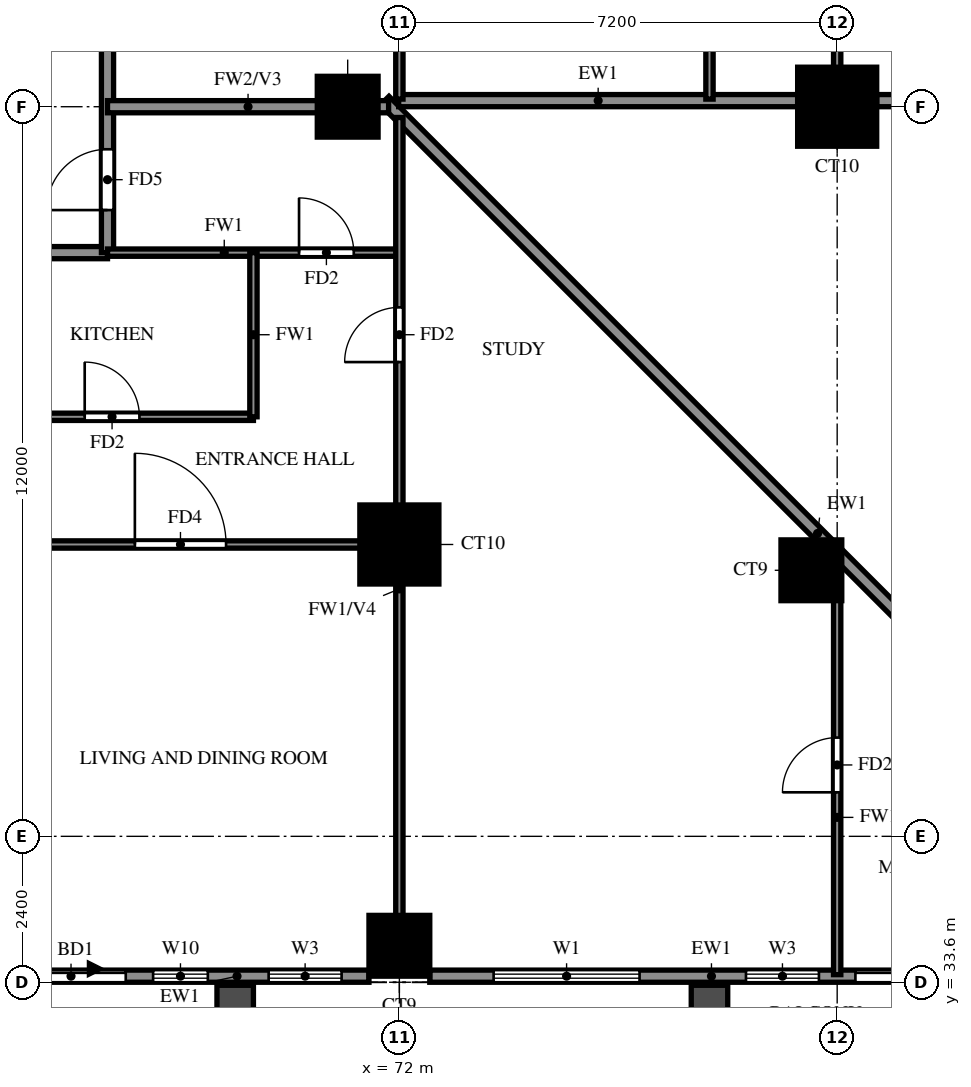
"""IFC4 building model, lengths in metres.
Left out: names, types, materials, properties, quantities, classifications, styles, units other than length and angle.
Written with IfcOpenShell. Run it as: python <this file> out.ifc"""

import sys

from ifc_helpers import new_model, si_unit, direction, frame, frame_2d, origin, origin_2d, place, context, subcontext, project, spatial, rectangle, extrude, source, transform, mapped, element, fill, save


model = new_model("IFC4")
c1 = context("Model", 3, precision=1e-05, world=origin(), true_north=direction((0.0, 1.0)))
c2 = subcontext(c1, "Body", "Model", "MODEL_VIEW")
j1 = project(units=[si_unit("LENGTHUNIT", "METRE"), si_unit("PLANEANGLEUNIT", "RADIAN")], contexts=[c1])
p1 = place(None, origin())
s1 = spatial("IfcSite", under=j1, at=p1, CompositionType="ELEMENT")
p2 = place(p1, origin())
s2 = spatial("IfcBuilding", under=s1, at=p2, CompositionType="ELEMENT")
p3 = place(p2, frame((0.0, 0.0, 62.0)))
s3 = spatial("IfcBuildingStorey", under=s2, at=p3, CompositionType="ELEMENT", Elevation=62.0)
m1 = source(origin(), c2, "Body", "SweptSolid", [
    extrude(rectangle(XDim=1.0, YDim=1.0, at=origin_2d()), origin(), (0.0, 0.0, 1.0), 3.18),
])
for number, where, z_axis, x_axis in (
    (1, (72.0, 34.2, 0.0), (0.0, 0.0, 1.0), (1.0, 0.0, 0.0)),
    (2, (78.776, 40.376, 0.0), (0.0, 0.0, 1.0), (1.0, 0.0, 0.0)),
):
    element("IfcColumn", number, at=place(p3, frame(where, z_axis=z_axis, x_axis=x_axis)), inside=s3, PredefinedType="COLUMN", context=c2, shape_type="MappedRepresentation", body=[
        mapped(m1, transform((0.0, 0.0, 0.0))),
    ])
m2 = source(origin(), c2, "Body", "SweptSolid", [
    extrude(rectangle(XDim=1.3, YDim=1.3, at=origin_2d()), origin(), (0.0, 0.0, 1.0), 3.18),
])
p4 = place(p3, frame((72.0, 40.8, 0.0), z_axis=(0.0, 0.0, 1.0), x_axis=(1.0, 0.0, 0.0)))
e3 = element("IfcColumn", 3, at=p4, inside=s3, PredefinedType="COLUMN", context=c2, shape_type="MappedRepresentation", body=[
    mapped(m2, transform((0.0, 0.0, 0.0))),
])
p5 = place(p3, frame((71.15, 48.0, 0.0), z_axis=(0.0, 0.0, 1.0), x_axis=(1.0, 0.0, 0.0)))
e4 = element("IfcColumn", 4, at=p5, inside=s3, PredefinedType="COLUMN", context=c2, shape_type="MappedRepresentation", body=[
    mapped(m1, transform((0.0, 0.0, 0.0))),
])
p6 = place(p3, frame((79.2, 48.0, 0.0), z_axis=(0.0, 0.0, 1.0), x_axis=(1.0, 0.0, 0.0)))
e5 = element("IfcColumn", 5, at=p6, inside=s3, PredefinedType="COLUMN", context=c2, shape_type="MappedRepresentation", body=[
    mapped(m2, transform((0.0, 0.0, 0.0))),
])
p7 = place(p3, frame((85.996, 33.863, 0.0), z_axis=(0.0, 0.0, 1.0), x_axis=(-0.707100718496, 0.707112843825, 0.0)))
e6 = element("IfcWall", 6, at=p7, inside=s3, PredefinedType="SOLIDWALL", context=c2, shape_type="SweptSolid", body=[
    extrude(rectangle(XDim=20.135, YDim=0.2, at=frame_2d((10.067, 0.0))), origin(), (0.0, 0.0, 1.0), 3.18),
])
p8 = place(p3, frame((71.989, 48.1, 0.0), z_axis=(0.0, 0.0, 1.0), x_axis=(1.0, 0.0, 0.0)))
e7 = element("IfcWall", 7, at=p8, inside=s3, PredefinedType="SOLIDWALL", context=c2, shape_type="SweptSolid", body=[
    extrude(rectangle(XDim=6.562, YDim=0.2, at=frame_2d((3.281, 0.0))), origin(), (0.0, 0.0, 1.0), 3.18),
])
p9 = place(p3, frame((79.85, 48.1, 0.0), z_axis=(0.0, 0.0, 1.0), x_axis=(1.0, 0.0, 0.0)))
e8 = element("IfcWall", 8, at=p9, inside=s3, PredefinedType="SOLIDWALL", context=c2, shape_type="SweptSolid", body=[
    extrude(rectangle(XDim=5.45, YDim=0.2, at=frame_2d((2.725, 0.0))), origin(), (0.0, 0.0, 1.0), 3.18),
])
p10 = place(p9, frame((1.525, 0.0, 0.6)))
e9 = element("IfcOpeningElement", 9, at=p10, cuts=e8, PredefinedType="OPENING", context=c2, shape_type="SweptSolid", body=[
    extrude(rectangle(XDim=2.4, YDim=2.4, at=frame_2d((1.2, 1.2))), frame((0.0, 0.11, 0.0), z_axis=(0.0, -1.0, 0.0), x_axis=(1.0, 0.0, 0.0)), (0.0, 0.0, 1.0), 0.22),
])
p11 = place(p3, frame((65.3, 33.7, 0.0), z_axis=(0.0, 0.0, 1.0), x_axis=(1.0, 0.0, 0.0)))
e10 = element("IfcWall", 10, at=p11, inside=s3, PredefinedType="SOLIDWALL", context=c2, shape_type="SweptSolid", body=[
    extrude(rectangle(XDim=6.2, YDim=0.2, at=frame_2d((3.1, 0.0))), origin(), (0.0, 0.0, 1.0), 3.18),
])
p12 = place(p11, frame((0.4, 0.0, 0.0)))
e11 = element("IfcOpeningElement", 11, at=p12, cuts=e10, PredefinedType="OPENING", context=c2, shape_type="SweptSolid", body=[
    extrude(rectangle(XDim=1.8, YDim=2.4, at=frame_2d((0.9, 1.2))), frame((0.0, 0.11, 0.0), z_axis=(0.0, -1.0, 0.0), x_axis=(1.0, 0.0, 0.0)), (0.0, 0.0, 1.0), 0.22),
])
p13 = place(p11, frame((2.65, 0.0, 0.6)))
e12 = element("IfcOpeningElement", 12, at=p13, cuts=e10, PredefinedType="OPENING", context=c2, shape_type="SweptSolid", body=[
    extrude(rectangle(XDim=0.9, YDim=2.4, at=frame_2d((0.45, 1.2))), frame((0.0, 0.11, 0.0), z_axis=(0.0, -1.0, 0.0), x_axis=(1.0, 0.0, 0.0)), (0.0, 0.0, 1.0), 0.22),
])
p14 = place(p11, frame((4.55, 0.0, 0.6)))
e13 = element("IfcOpeningElement", 13, at=p14, cuts=e10, PredefinedType="OPENING", context=c2, shape_type="SweptSolid", body=[
    extrude(rectangle(XDim=1.2, YDim=2.4, at=frame_2d((0.6, 1.2))), frame((0.0, 0.11, 0.0), z_axis=(0.0, -1.0, 0.0), x_axis=(1.0, 0.0, 0.0)), (0.0, 0.0, 1.0), 0.22),
])
p15 = place(p3, frame((72.5, 33.7, 0.0), z_axis=(0.0, 0.0, 1.0), x_axis=(1.0, 0.0, 0.0)))
e14 = element("IfcWall", 14, at=p15, inside=s3, PredefinedType="SOLIDWALL", context=c2, shape_type="SweptSolid", body=[
    extrude(rectangle(XDim=10.9, YDim=0.2, at=frame_2d((5.45, 0.0))), origin(), (0.0, 0.0, 1.0), 3.18),
])
p16 = place(p15, frame((7.0, 0.0, 0.0)))
e15 = element("IfcOpeningElement", 15, at=p16, cuts=e14, PredefinedType="OPENING", context=c2, shape_type="SweptSolid", body=[
    extrude(rectangle(XDim=1.8, YDim=2.4, at=frame_2d((0.9, 1.2))), frame((0.0, 0.11, 0.0), z_axis=(0.0, -1.0, 0.0), x_axis=(1.0, 0.0, 0.0)), (0.0, 0.0, 1.0), 0.22),
])
p17 = place(p15, frame((1.05, 0.0, 0.6)))
e16 = element("IfcOpeningElement", 16, at=p17, cuts=e14, PredefinedType="OPENING", context=c2, shape_type="SweptSolid", body=[
    extrude(rectangle(XDim=2.4, YDim=2.4, at=frame_2d((1.2, 1.2))), frame((0.0, 0.11, 0.0), z_axis=(0.0, -1.0, 0.0), x_axis=(1.0, 0.0, 0.0)), (0.0, 0.0, 1.0), 0.22),
])
p18 = place(p15, frame((5.2, 0.0, 0.6)))
e17 = element("IfcOpeningElement", 17, at=p18, cuts=e14, PredefinedType="OPENING", context=c2, shape_type="SweptSolid", body=[
    extrude(rectangle(XDim=1.2, YDim=2.4, at=frame_2d((0.6, 1.2))), frame((0.0, 0.11, 0.0), z_axis=(0.0, -1.0, 0.0), x_axis=(1.0, 0.0, 0.0)), (0.0, 0.0, 1.0), 0.22),
])
p19 = place(p15, frame((9.3, 0.0, 0.6)))
e18 = element("IfcOpeningElement", 18, at=p19, cuts=e14, PredefinedType="OPENING", context=c2, shape_type="SweptSolid", body=[
    extrude(rectangle(XDim=1.2, YDim=2.4, at=frame_2d((0.6, 1.2))), frame((0.0, 0.11, 0.0), z_axis=(0.0, -1.0, 0.0), x_axis=(1.0, 0.0, 0.0)), (0.0, 0.0, 1.0), 0.22),
])
for number, where, z_axis, x_axis in (
    (19, (69.3, 33.55, 0.0), (0.0, 0.0, 1.0), (0.0, -1.0, 0.0)),
    (20, (77.1, 33.55, 0.0), (0.0, 0.0, 1.0), (0.0, -1.0, 0.0)),
):
    element("IfcWall", number, at=place(p3, frame(where, z_axis=z_axis, x_axis=x_axis)), inside=s3, PredefinedType="SOLIDWALL", context=c2, shape_type="SweptSolid", body=[
        extrude(rectangle(XDim=2.65, YDim=0.6, at=frame_2d((1.325, 0.0))), origin(), (0.0, 0.0, 1.0), 2.85),
    ])
p20 = place(p3, frame((60.0, 45.6, 0.0), z_axis=(0.0, 0.0, 1.0), x_axis=(1.0, 0.0, 0.0)))
e21 = element("IfcWall", 21, at=p20, inside=s3, PredefinedType="SOLIDWALL", context=c2, shape_type="SweptSolid", body=[
    extrude(rectangle(XDim=7.2, YDim=0.2, at=frame_2d((3.6, 0.0))), origin(), (0.0, 0.0, 1.0), 3.18),
])
p21 = place(p3, frame((67.2, 45.6, 0.0), z_axis=(0.0, 0.0, 1.0), x_axis=(0.0, 1.0, 0.0)))
e22 = element("IfcWall", 22, at=p21, inside=s3, PredefinedType="SOLIDWALL", context=c2, shape_type="SweptSolid", body=[
    extrude(rectangle(XDim=12.0, YDim=0.2, at=frame_2d((6.0, 0.0))), origin(), (0.0, 0.0, 1.0), 3.18),
])
p22 = place(p21, frame((10.3, 0.0, 0.0)))
e23 = element("IfcOpeningElement", 23, at=p22, cuts=e22, PredefinedType="OPENING", context=c2, shape_type="SweptSolid", body=[
    extrude(rectangle(XDim=1.0, YDim=2.1, at=frame_2d((0.5, 1.05))), frame((0.0, 0.11, 0.0), z_axis=(0.0, -1.0, 0.0), x_axis=(1.0, 0.0, 0.0)), (0.0, 0.0, 1.0), 0.22),
])
p23 = place(p21, frame((0.7, 0.0, 0.0)))
e24 = element("IfcOpeningElement", 24, at=p23, cuts=e22, PredefinedType="OPENING", context=c2, shape_type="SweptSolid", body=[
    extrude(rectangle(XDim=1.0, YDim=2.1, at=frame_2d((0.5, 1.05))), frame((0.0, 0.11, 0.0), z_axis=(0.0, -1.0, 0.0), x_axis=(1.0, 0.0, 0.0)), (0.0, 0.0, 1.0), 0.22),
])
p24 = place(p3, frame((67.2, 48.0, 0.0), z_axis=(0.0, 0.0, 1.0), x_axis=(1.0, 0.0, 0.0)))
e25 = element("IfcWall", 25, at=p24, inside=s3, PredefinedType="SOLIDWALL", context=c2, shape_type="SweptSolid", body=[
    extrude(rectangle(XDim=4.623, YDim=0.2, at=frame_2d((2.312, 0.0))), origin(), (0.0, 0.0, 1.0), 3.18),
])
p25 = place(p3, frame((60.0, 40.8, 0.0), z_axis=(0.0, 0.0, 1.0), x_axis=(1.0, 0.0, 0.0)))
e26 = element("IfcWall", 26, at=p25, inside=s3, PredefinedType="PARTITIONING", context=c2, shape_type="SweptSolid", body=[
    extrude(rectangle(XDim=12.0, YDim=0.12, at=frame_2d((6.0, 0.0))), origin(), (0.0, 0.0, 1.0), 3.18),
])
p26 = place(p25, frame((7.65, 0.0, 0.0)))
e27 = element("IfcOpeningElement", 27, at=p26, cuts=e26, PredefinedType="OPENING", context=c2, shape_type="SweptSolid", body=[
    extrude(rectangle(XDim=1.5, YDim=2.1, at=frame_2d((0.75, 1.05))), frame((0.0, 0.07, 0.0), z_axis=(0.0, -1.0, 0.0), x_axis=(1.0, 0.0, 0.0)), (0.0, 0.0, 1.0), 0.14),
])
p27 = place(p25, frame((1.95, 0.0, 0.0)))
e28 = element("IfcOpeningElement", 28, at=p27, cuts=e26, PredefinedType="OPENING", context=c2, shape_type="SweptSolid", body=[
    extrude(rectangle(XDim=0.9, YDim=2.1, at=frame_2d((0.45, 1.05))), frame((0.0, 0.07, 0.0), z_axis=(0.0, -1.0, 0.0), x_axis=(1.0, 0.0, 0.0)), (0.0, 0.0, 1.0), 0.14),
])
p28 = place(p3, frame((60.0, 42.9, 0.0), z_axis=(0.0, 0.0, 1.0), x_axis=(1.0, 0.0, 0.0)))
e29 = element("IfcWall", 29, at=p28, inside=s3, PredefinedType="PARTITIONING", context=c2, shape_type="SweptSolid", body=[
    extrude(rectangle(XDim=9.6, YDim=0.12, at=frame_2d((4.8, 0.0))), origin(), (0.0, 0.0, 1.0), 3.18),
])
p29 = place(p28, frame((6.825, 0.0, 0.0)))
e30 = element("IfcOpeningElement", 30, at=p29, cuts=e29, PredefinedType="OPENING", context=c2, shape_type="SweptSolid", body=[
    extrude(rectangle(XDim=0.9, YDim=2.1, at=frame_2d((0.45, 1.05))), frame((0.0, 0.07, 0.0), z_axis=(0.0, -1.0, 0.0), x_axis=(1.0, 0.0, 0.0)), (0.0, 0.0, 1.0), 0.14),
])
p30 = place(p28, frame((3.3, 0.0, 0.0)))
e31 = element("IfcOpeningElement", 31, at=p30, cuts=e29, PredefinedType="OPENING", context=c2, shape_type="SweptSolid", body=[
    extrude(rectangle(XDim=0.8, YDim=2.1, at=frame_2d((0.4, 1.05))), frame((0.0, 0.07, 0.0), z_axis=(0.0, -1.0, 0.0), x_axis=(1.0, 0.0, 0.0)), (0.0, 0.0, 1.0), 0.14),
])
p31 = place(p28, frame((0.775, 0.0, 0.0)))
e32 = element("IfcOpeningElement", 32, at=p31, cuts=e29, PredefinedType="OPENING", context=c2, shape_type="SweptSolid", body=[
    extrude(rectangle(XDim=0.9, YDim=2.1, at=frame_2d((0.45, 1.05))), frame((0.0, 0.07, 0.0), z_axis=(0.0, -1.0, 0.0), x_axis=(1.0, 0.0, 0.0)), (0.0, 0.0, 1.0), 0.14),
])
p32 = place(p3, frame((67.2, 45.6, 0.0), z_axis=(0.0, 0.0, 1.0), x_axis=(1.0, 0.0, 0.0)))
e33 = element("IfcWall", 33, at=p32, inside=s3, PredefinedType="PARTITIONING", context=c2, shape_type="SweptSolid", body=[
    extrude(rectangle(XDim=4.8, YDim=0.12, at=frame_2d((2.4, 0.0))), origin(), (0.0, 0.0, 1.0), 3.18),
])
p33 = place(p32, frame((3.15, 0.0, 0.0)))
e34 = element("IfcOpeningElement", 34, at=p33, cuts=e33, PredefinedType="OPENING", context=c2, shape_type="SweptSolid", body=[
    extrude(rectangle(XDim=0.9, YDim=2.1, at=frame_2d((0.45, 1.05))), frame((0.0, 0.07, 0.0), z_axis=(0.0, -1.0, 0.0), x_axis=(1.0, 0.0, 0.0)), (0.0, 0.0, 1.0), 0.14),
])
p34 = place(p3, frame((69.6, 42.9, 0.0), z_axis=(0.0, 0.0, 1.0), x_axis=(0.0, 1.0, 0.0)))
e35 = element("IfcWall", 35, at=p34, inside=s3, PredefinedType="PARTITIONING", context=c2, shape_type="SweptSolid", body=[
    extrude(rectangle(XDim=2.7, YDim=0.12, at=frame_2d((1.35, 0.0))), origin(), (0.0, 0.0, 1.0), 3.18),
])
p35 = place(p3, frame((72.0, 33.725, 0.0), z_axis=(0.0, 0.0, 1.0), x_axis=(0.0, 1.0, 0.0)))
e36 = element("IfcWall", 36, at=p35, inside=s3, PredefinedType="PARTITIONING", context=c2, shape_type="SweptSolid", body=[
    extrude(rectangle(XDim=14.098, YDim=0.12, at=frame_2d((7.049, 0.0))), origin(), (0.0, 0.0, 1.0), 2.28),
])
p36 = place(p35, frame((10.075, 0.0, 0.0)))
e37 = element("IfcOpeningElement", 37, at=p36, cuts=e36, PredefinedType="OPENING", context=c2, shape_type="SweptSolid", body=[
    extrude(rectangle(XDim=0.9, YDim=2.1, at=frame_2d((0.45, 1.05))), frame((0.0, 0.07, 0.0), z_axis=(0.0, -1.0, 0.0), x_axis=(1.0, 0.0, 0.0)), (0.0, 0.0, 1.0), 0.14),
])
p37 = place(p3, frame((72.0, 48.125, 0.0), z_axis=(0.0, 0.0, 1.0), x_axis=(0.0, 1.0, 0.0)))
e38 = element("IfcWall", 38, at=p37, inside=s3, PredefinedType="PARTITIONING", context=c2, shape_type="SweptSolid", body=[
    extrude(rectangle(XDim=7.075, YDim=0.12, at=frame_2d((3.538, 0.0))), origin(), (0.0, 0.0, 1.0), 3.18),
])
p38 = place(p3, frame((77.1, 48.125, 0.0), z_axis=(0.0, 0.0, 1.0), x_axis=(0.0, 1.0, 0.0)))
e39 = element("IfcWall", 39, at=p38, inside=s3, PredefinedType="PARTITIONING", context=c2, shape_type="SweptSolid", body=[
    extrude(rectangle(XDim=7.075, YDim=0.12, at=frame_2d((3.538, 0.0))), origin(), (0.0, 0.0, 1.0), 3.18),
])
p39 = place(p38, frame((3.087, 0.0, 0.0)))
e40 = element("IfcOpeningElement", 40, at=p39, cuts=e39, PredefinedType="OPENING", context=c2, shape_type="SweptSolid", body=[
    extrude(rectangle(XDim=0.9, YDim=2.1, at=frame_2d((0.45, 1.05))), frame((0.0, 0.07, 0.0), z_axis=(0.0, -1.0, 0.0), x_axis=(1.0, 0.0, 0.0)), (0.0, 0.0, 1.0), 0.14),
])
p40 = place(p3, frame((79.2, 33.725, 0.0), z_axis=(0.0, 0.0, 1.0), x_axis=(0.0, 1.0, 0.0)))
e41 = element("IfcWall", 41, at=p40, inside=s3, PredefinedType="PARTITIONING", context=c2, shape_type="SweptSolid", body=[
    extrude(rectangle(XDim=6.898, YDim=0.12, at=frame_2d((3.449, 0.0))), origin(), (0.0, 0.0, 1.0), 3.18),
])
p41 = place(p40, frame((2.999, 0.0, 0.0)))
e42 = element("IfcOpeningElement", 42, at=p41, cuts=e41, PredefinedType="OPENING", context=c2, shape_type="SweptSolid", body=[
    extrude(rectangle(XDim=0.9, YDim=2.1, at=frame_2d((0.45, 1.05))), frame((0.0, 0.07, 0.0), z_axis=(0.0, -1.0, 0.0), x_axis=(1.0, 0.0, 0.0)), (0.0, 0.0, 1.0), 0.14),
])
p42 = place(p3, frame((79.2, 48.125, 0.0), z_axis=(0.0, 0.0, 1.0), x_axis=(0.0, 1.0, 0.0)))
e43 = element("IfcWall", 43, at=p42, inside=s3, PredefinedType="PARTITIONING", context=c2, shape_type="SweptSolid", body=[
    extrude(rectangle(XDim=21.475, YDim=0.12, at=frame_2d((10.738, 0.0))), origin(), (0.0, 0.0, 1.0), 3.18),
])
p43 = place(p42, frame((1.288, 0.0, 0.0)))
e44 = element("IfcOpeningElement", 44, at=p43, cuts=e43, PredefinedType="OPENING", context=c2, shape_type="SweptSolid", body=[
    extrude(rectangle(XDim=0.9, YDim=2.1, at=frame_2d((0.45, 1.05))), frame((0.0, 0.07, 0.0), z_axis=(0.0, -1.0, 0.0), x_axis=(1.0, 0.0, 0.0)), (0.0, 0.0, 1.0), 0.14),
])
p44 = place(p42, frame((4.825, 0.0, 0.0)))
e45 = element("IfcOpeningElement", 45, at=p44, cuts=e43, PredefinedType="OPENING", context=c2, shape_type="SweptSolid", body=[
    extrude(rectangle(XDim=0.9, YDim=2.1, at=frame_2d((0.45, 1.05))), frame((0.0, 0.07, 0.0), z_axis=(0.0, -1.0, 0.0), x_axis=(1.0, 0.0, 0.0)), (0.0, 0.0, 1.0), 0.14),
])
p45 = place(p42, frame((9.925, 0.0, 0.0)))
e46 = element("IfcOpeningElement", 46, at=p45, cuts=e43, PredefinedType="OPENING", context=c2, shape_type="SweptSolid", body=[
    extrude(rectangle(XDim=1.5, YDim=2.1, at=frame_2d((0.75, 1.05))), frame((0.0, 0.07, 0.0), z_axis=(0.0, -1.0, 0.0), x_axis=(1.0, 0.0, 0.0)), (0.0, 0.0, 1.0), 0.14),
])
p46 = place(p42, frame((15.625, 0.0, 0.0)))
e47 = element("IfcOpeningElement", 47, at=p46, cuts=e43, PredefinedType="OPENING", context=c2, shape_type="SweptSolid", body=[
    extrude(rectangle(XDim=0.9, YDim=2.1, at=frame_2d((0.45, 1.05))), frame((0.0, 0.07, 0.0), z_axis=(0.0, -1.0, 0.0), x_axis=(1.0, 0.0, 0.0)), (0.0, 0.0, 1.0), 0.14),
])
p47 = place(p42, frame((19.225, 0.0, 0.0)))
e48 = element("IfcOpeningElement", 48, at=p47, cuts=e43, PredefinedType="OPENING", context=c2, shape_type="SweptSolid", body=[
    extrude(rectangle(XDim=0.9, YDim=2.1, at=frame_2d((0.45, 1.05))), frame((0.0, 0.07, 0.0), z_axis=(0.0, -1.0, 0.0), x_axis=(1.0, 0.0, 0.0)), (0.0, 0.0, 1.0), 0.14),
])
p48 = place(p12, origin())
e49 = element("IfcDoor", 49, at=p48, inside=s3, OperationType="DOUBLE_DOOR_SLIDING", PredefinedType="DOOR", context=c2, shape_type="SweptSolid", body=[
    extrude(rectangle(XDim=1.8, YDim=2.4, at=frame_2d((0.9, 1.2))), frame((0.0, 0.025, 0.0), z_axis=(0.0, -1.0, 0.0), x_axis=(1.0, 0.0, 0.0)), (0.0, 0.0, 1.0), 0.05),
])
fill(e11, e49)
p49 = place(p13, origin())
e50 = element("IfcWindow", 50, at=p49, inside=s3, PartitioningType="SINGLE_PANEL", PredefinedType="WINDOW", context=c2, shape_type="SweptSolid", body=[
    extrude(rectangle(XDim=0.9, YDim=2.4, at=frame_2d((0.45, 1.2))), frame((0.0, 0.03, 0.0), z_axis=(0.0, -1.0, 0.0), x_axis=(1.0, 0.0, 0.0)), (0.0, 0.0, 1.0), 0.06),
])
fill(e12, e50)
p50 = place(p14, origin())
e51 = element("IfcWindow", 51, at=p50, inside=s3, PartitioningType="SINGLE_PANEL", PredefinedType="WINDOW", context=c2, shape_type="SweptSolid", body=[
    extrude(rectangle(XDim=1.2, YDim=2.4, at=frame_2d((0.6, 1.2))), frame((0.0, 0.03, 0.0), z_axis=(0.0, -1.0, 0.0), x_axis=(1.0, 0.0, 0.0)), (0.0, 0.0, 1.0), 0.06),
])
fill(e13, e51)
p51 = place(p16, origin())
e52 = element("IfcDoor", 52, at=p51, inside=s3, OperationType="DOUBLE_DOOR_SLIDING", PredefinedType="DOOR", context=c2, shape_type="SweptSolid", body=[
    extrude(rectangle(XDim=1.8, YDim=2.4, at=frame_2d((0.9, 1.2))), frame((0.0, 0.025, 0.0), z_axis=(0.0, -1.0, 0.0), x_axis=(1.0, 0.0, 0.0)), (0.0, 0.0, 1.0), 0.05),
])
fill(e15, e52)
p52 = place(p17, origin())
e53 = element("IfcWindow", 53, at=p52, inside=s3, PartitioningType="DOUBLE_PANEL_VERTICAL", PredefinedType="WINDOW", context=c2, shape_type="SweptSolid", body=[
    extrude(rectangle(XDim=2.4, YDim=2.4, at=frame_2d((1.2, 1.2))), frame((0.0, 0.03, 0.0), z_axis=(0.0, -1.0, 0.0), x_axis=(1.0, 0.0, 0.0)), (0.0, 0.0, 1.0), 0.06),
])
fill(e16, e53)
p53 = place(p18, origin())
e54 = element("IfcWindow", 54, at=p53, inside=s3, PartitioningType="SINGLE_PANEL", PredefinedType="WINDOW", context=c2, shape_type="SweptSolid", body=[
    extrude(rectangle(XDim=1.2, YDim=2.4, at=frame_2d((0.6, 1.2))), frame((0.0, 0.03, 0.0), z_axis=(0.0, -1.0, 0.0), x_axis=(1.0, 0.0, 0.0)), (0.0, 0.0, 1.0), 0.06),
])
fill(e17, e54)
p54 = place(p33, origin())
e55 = element("IfcDoor", 55, at=p54, inside=s3, OperationType="SINGLE_SWING_LEFT", PredefinedType="DOOR", context=c2, shape_type="SweptSolid", body=[
    extrude(rectangle(XDim=0.9, YDim=2.1, at=frame_2d((0.45, 1.05))), frame((0.0, 0.025, 0.0), z_axis=(0.0, -1.0, 0.0), x_axis=(1.0, 0.0, 0.0)), (0.0, 0.0, 1.0), 0.05),
])
fill(e34, e55)
p55 = place(p23, origin())
e56 = element("IfcDoor", 56, at=p55, inside=s3, OperationType="SINGLE_SWING_LEFT", PredefinedType="DOOR", context=c2, shape_type="SweptSolid", body=[
    extrude(rectangle(XDim=1.0, YDim=2.1, at=frame_2d((0.5, 1.05))), frame((0.0, 0.025, 0.0), z_axis=(0.0, -1.0, 0.0), x_axis=(1.0, 0.0, 0.0)), (0.0, 0.0, 1.0), 0.05),
])
fill(e24, e56)
p56 = place(p26, origin())
e57 = element("IfcDoor", 57, at=p56, inside=s3, OperationType="SINGLE_SWING_RIGHT", PredefinedType="DOOR", context=c2, shape_type="SweptSolid", body=[
    extrude(rectangle(XDim=1.5, YDim=2.1, at=frame_2d((0.75, 1.05))), frame((0.0, 0.025, 0.0), z_axis=(0.0, -1.0, 0.0), x_axis=(1.0, 0.0, 0.0)), (0.0, 0.0, 1.0), 0.05),
])
fill(e27, e57)
p57 = place(p29, origin())
e58 = element("IfcDoor", 58, at=p57, inside=s3, OperationType="SINGLE_SWING_LEFT", PredefinedType="DOOR", context=c2, shape_type="SweptSolid", body=[
    extrude(rectangle(XDim=0.9, YDim=2.1, at=frame_2d((0.45, 1.05))), frame((0.0, 0.025, 0.0), z_axis=(0.0, -1.0, 0.0), x_axis=(1.0, 0.0, 0.0)), (0.0, 0.0, 1.0), 0.05),
])
fill(e30, e58)
p58 = place(p36, origin())
e59 = element("IfcDoor", 59, at=p58, inside=s3, OperationType="SINGLE_SWING_LEFT", PredefinedType="DOOR", context=c2, shape_type="SweptSolid", body=[
    extrude(rectangle(XDim=0.9, YDim=2.1, at=frame_2d((0.45, 1.05))), frame((0.0, 0.025, 0.0), z_axis=(0.0, -1.0, 0.0), x_axis=(1.0, 0.0, 0.0)), (0.0, 0.0, 1.0), 0.05),
])
fill(e37, e59)
p59 = place(p41, origin())
e60 = element("IfcDoor", 60, at=p59, inside=s3, OperationType="SINGLE_SWING_RIGHT", PredefinedType="DOOR", context=c2, shape_type="SweptSolid", body=[
    extrude(rectangle(XDim=0.9, YDim=2.1, at=frame_2d((0.45, 1.05))), frame((0.0, 0.025, 0.0), z_axis=(0.0, -1.0, 0.0), x_axis=(1.0, 0.0, 0.0)), (0.0, 0.0, 1.0), 0.05),
])
fill(e42, e60)
save(model, sys.argv[1])
